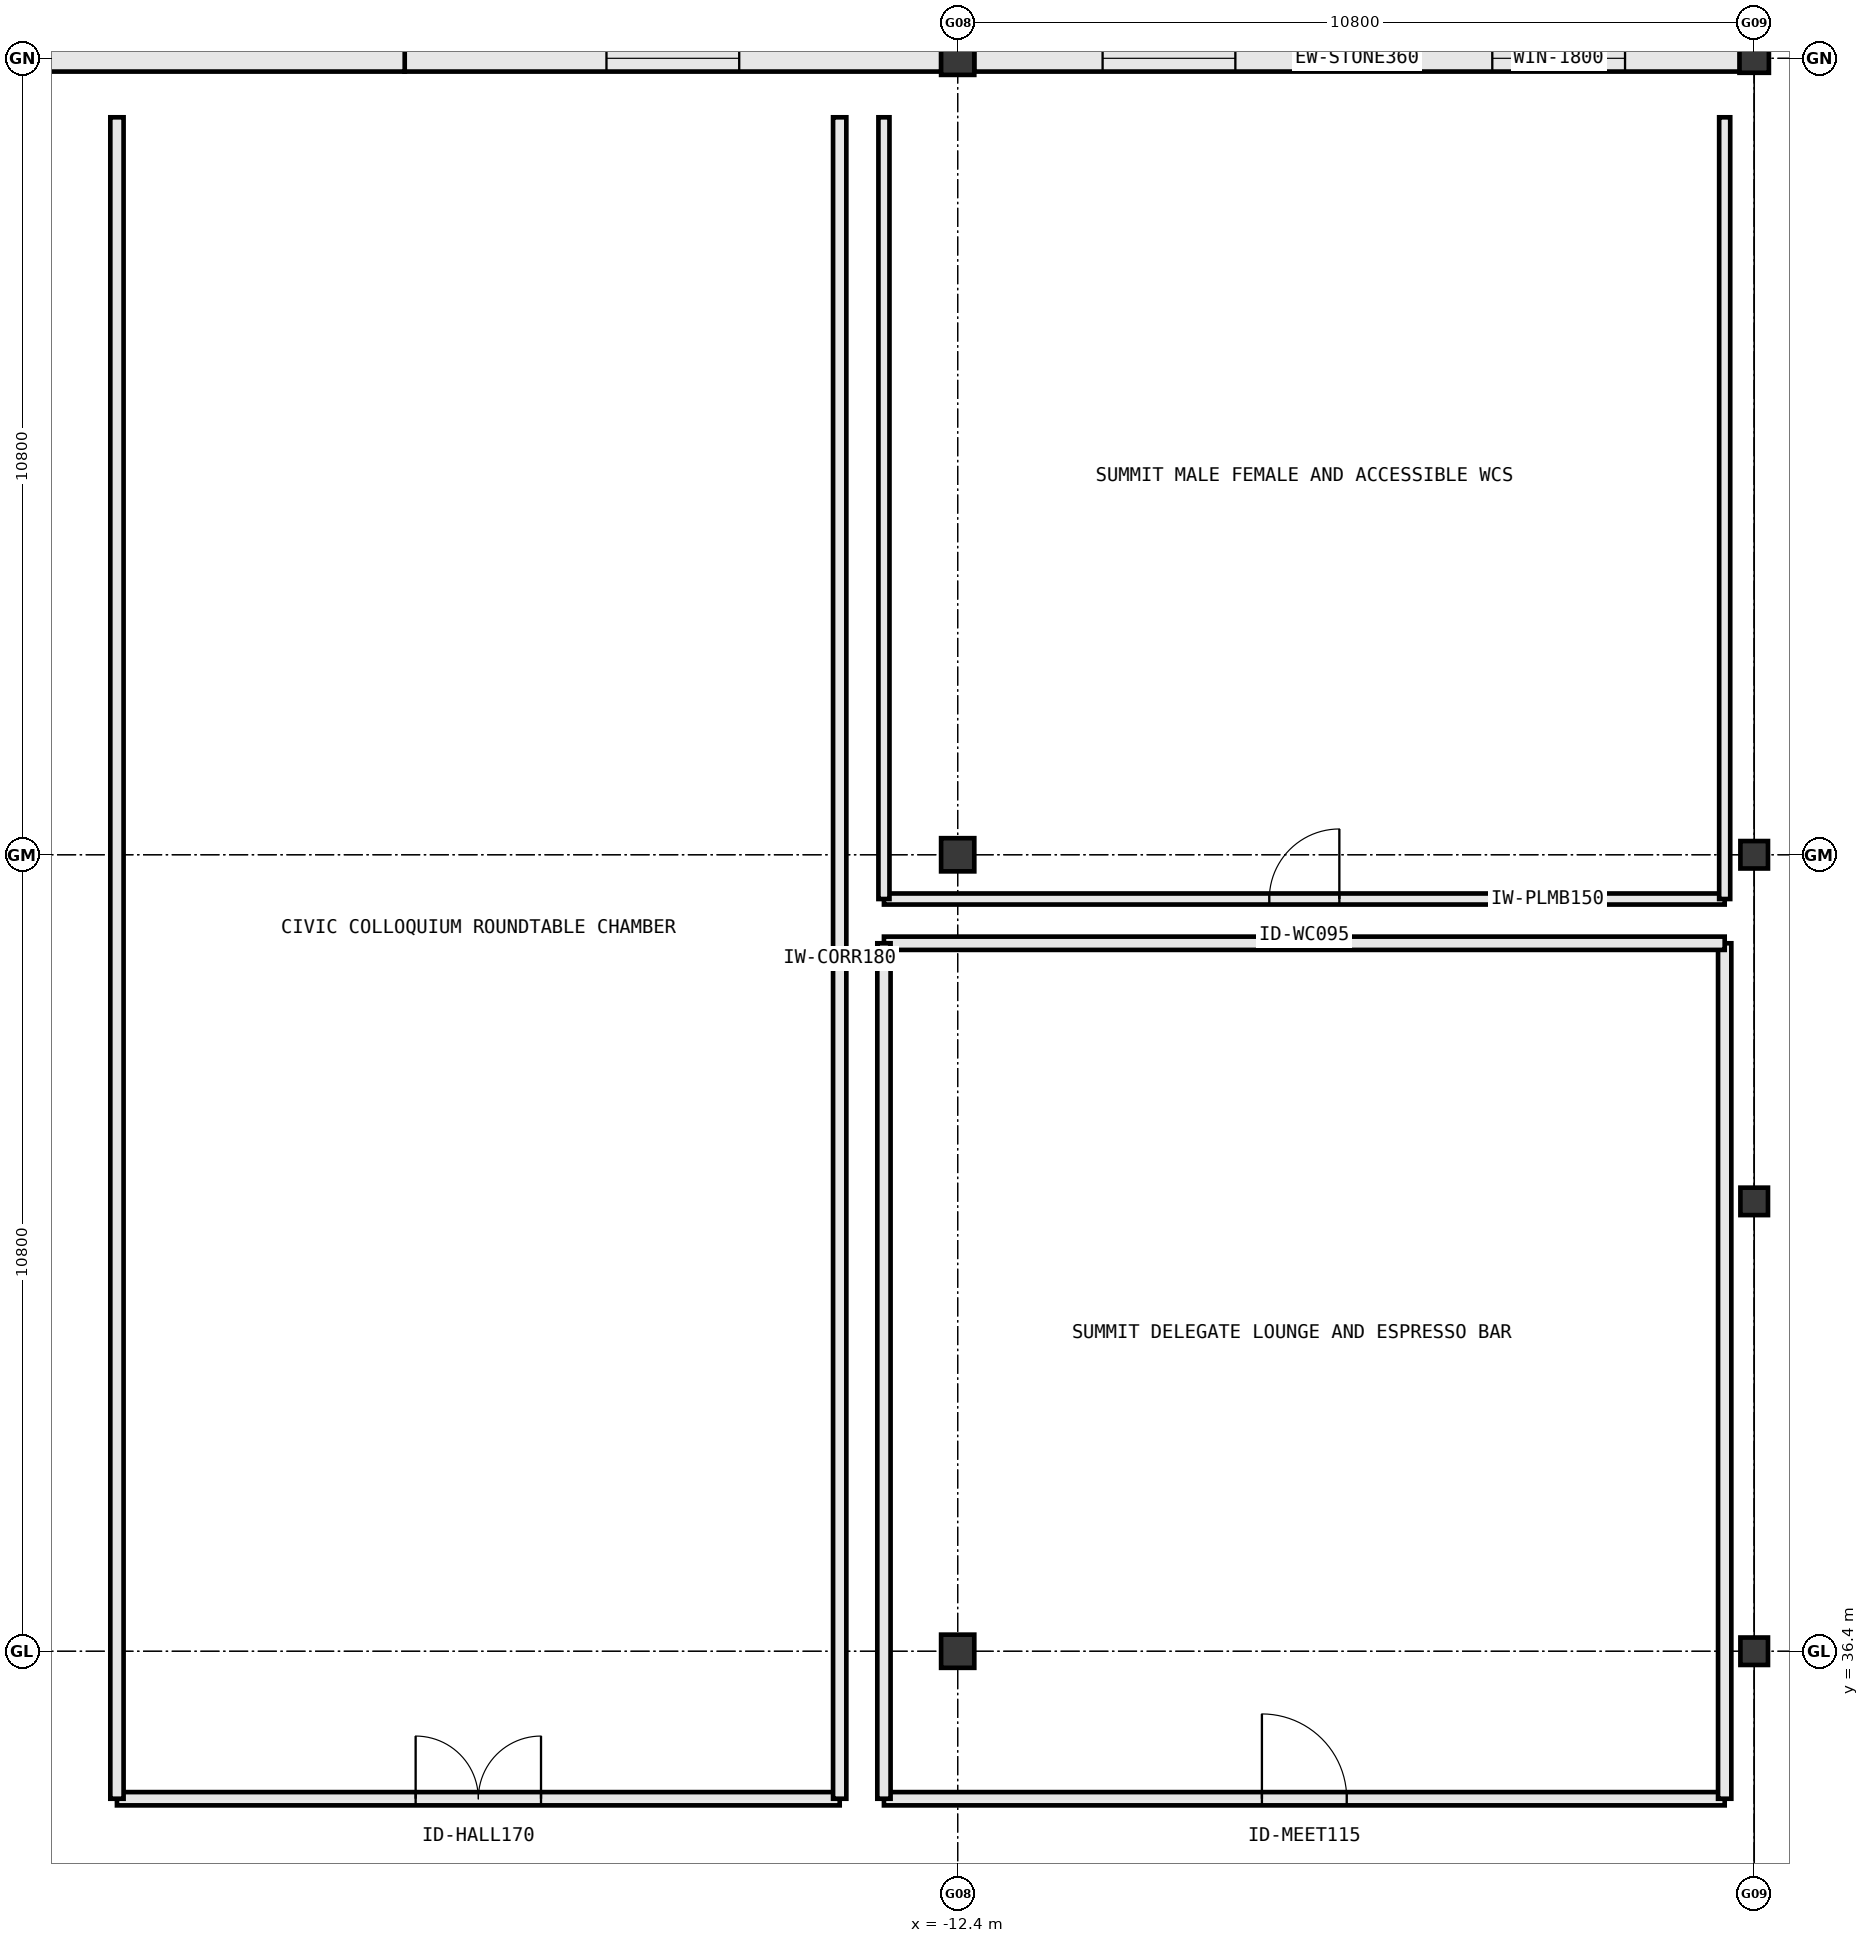
"""IFC4 building model, lengths in metres.
Left out: names, types, materials, properties, quantities, classifications, styles, units other than length and angle.
Written with IfcOpenShell. Run it as: python <this file> out.ifc"""

import sys

from ifc_helpers import new_model, si_unit, direction, frame, frame_2d, origin, origin_2d, place, context, subcontext, project, spatial, rectangle, i_section, extrude, element, fill, save


model = new_model("IFC4")
c1 = context("Model", 3, precision=1e-05, world=origin(), true_north=direction((0.0, 1.0)))
c2 = subcontext(c1, "Body", "Model", "MODEL_VIEW")
j1 = project(units=[si_unit("LENGTHUNIT", "METRE"), si_unit("PLANEANGLEUNIT", "RADIAN")], contexts=[c1])
p1 = place(None, origin())
s1 = spatial("IfcSite", under=j1, at=p1, CompositionType="ELEMENT")
p2 = place(p1, origin())
s2 = spatial("IfcBuilding", under=s1, at=p2, CompositionType="ELEMENT")
p3 = place(p2, frame((0.0, 0.0, 10.8)))
s3 = spatial("IfcBuildingStorey", under=s2, at=p3, CompositionType="ELEMENT", Elevation=10.8)
for number, where, z_axis, x_axis in (
    (1, (-12.4, 36.4, 0.0), (0.0, 0.0, 1.0), (1.0, 0.0, 0.0)),
    (2, (-12.4, 47.2, 0.0), (0.0, 0.0, 1.0), (1.0, 0.0, 0.0)),
    (3, (-12.4, 58.0, 0.0), (0.0, 0.0, 1.0), (1.0, 0.0, 0.0)),
):
    element("IfcColumn", number, at=place(p3, frame(where, z_axis=z_axis, x_axis=x_axis)), inside=s3, PredefinedType="COLUMN", context=c2, shape_type="SweptSolid", body=[
        extrude(rectangle(XDim=0.45, YDim=0.45, at=origin_2d()), origin(), (0.0, 0.0, 1.0), 5.4),
    ])
p4 = place(p3, frame((-1.6, 58.0, 0.0), z_axis=(0.0, 0.0, 1.0), x_axis=(1.0, 0.0, 0.0)))
e4 = element("IfcColumn", 4, at=p4, inside=s3, PredefinedType="COLUMN", context=c2, shape_type="SweptSolid", body=[
    extrude(i_section(OverallWidth=0.399, OverallDepth=0.393, WebThickness=0.023, FlangeThickness=0.037, at=origin_2d()), origin(), (0.0, 0.0, 1.0), 5.4),
])
p5 = place(p3, frame((-1.6, 36.4, 0.0), z_axis=(0.0, 0.0, 1.0), x_axis=(1.0, 0.0, 0.0)))
e5 = element("IfcColumn", 5, at=p5, inside=s3, PredefinedType="COLUMN", context=c2, shape_type="SweptSolid", body=[
    extrude(i_section(OverallWidth=0.374, OverallDepth=0.372, WebThickness=0.016, FlangeThickness=0.026, at=origin_2d()), origin(), (0.0, 0.0, 1.0), 5.4),
])
p6 = place(p3, frame((-1.6, 42.5, 0.0), z_axis=(0.0, 0.0, 1.0), x_axis=(1.0, 0.0, 0.0)))
e6 = element("IfcColumn", 6, at=p6, inside=s3, PredefinedType="COLUMN", context=c2, shape_type="SweptSolid", body=[
    extrude(i_section(OverallWidth=0.374, OverallDepth=0.372, WebThickness=0.016, FlangeThickness=0.026, at=origin_2d()), origin(), (0.0, 0.0, 1.0), 9.75),
])
p7 = place(p3, frame((-1.6, 47.2, 0.0), z_axis=(0.0, 0.0, 1.0), x_axis=(1.0, 0.0, 0.0)))
e7 = element("IfcColumn", 7, at=p7, inside=s3, PredefinedType="COLUMN", context=c2, shape_type="SweptSolid", body=[
    extrude(i_section(OverallWidth=0.374, OverallDepth=0.372, WebThickness=0.016, FlangeThickness=0.026, at=origin_2d()), origin(), (0.0, 0.0, 1.0), 5.4),
])
p8 = place(p3, frame((-1.609, 58.0, 0.0), z_axis=(0.0, 0.0, 1.0), x_axis=(-1.0, 0.0, 0.0)))
e8 = element("IfcWall", 8, at=p8, inside=s3, PredefinedType="STANDARD", context=c2, shape_type="SweptSolid", body=[
    extrude(rectangle(XDim=10.568, YDim=0.36, at=frame_2d((5.284, 0.0))), origin(), (0.0, 0.0, 1.0), 4.016),
])
p9 = place(p8, frame((1.742, 0.0, 0.85)))
e9 = element("IfcOpeningElement", 9, at=p9, cuts=e8, PredefinedType="OPENING", context=c2, shape_type="SweptSolid", body=[
    extrude(rectangle(XDim=1.8, YDim=1.85, at=frame_2d((0.9, 0.925))), frame((0.0, 0.192, 0.0), z_axis=(0.0, -1.0, 0.0), x_axis=(1.0, 0.0, 0.0)), (0.0, 0.0, 1.0), 0.384),
])
p10 = place(p8, frame((7.026, 0.0, 0.85)))
e10 = element("IfcOpeningElement", 10, at=p10, cuts=e8, PredefinedType="OPENING", context=c2, shape_type="SweptSolid", body=[
    extrude(rectangle(XDim=1.8, YDim=1.85, at=frame_2d((0.9, 0.925))), frame((0.0, 0.192, 0.0), z_axis=(0.0, -1.0, 0.0), x_axis=(1.0, 0.0, 0.0)), (0.0, 0.0, 1.0), 0.384),
])
p11 = place(p3, frame((-12.623, 58.0, 0.0), z_axis=(0.0, 0.0, 1.0), x_axis=(-1.0, 0.0, 0.0)))
e11 = element("IfcWall", 11, at=p11, inside=s3, PredefinedType="STANDARD", context=c2, shape_type="SweptSolid", body=[
    extrude(rectangle(XDim=7.279, YDim=0.36, at=frame_2d((3.64, 0.0))), origin(), (0.0, 0.0, 1.0), 4.016),
])
p12 = place(p11, frame((2.74, 0.0, 0.85)))
e12 = element("IfcOpeningElement", 12, at=p12, cuts=e11, PredefinedType="OPENING", context=c2, shape_type="SweptSolid", body=[
    extrude(rectangle(XDim=1.8, YDim=1.85, at=frame_2d((0.9, 0.925))), frame((0.0, 0.192, 0.0), z_axis=(0.0, -1.0, 0.0), x_axis=(1.0, 0.0, 0.0)), (0.0, 0.0, 1.0), 0.384),
])
p13 = place(p3, frame((-19.898, 58.0, 0.0), z_axis=(0.0, 0.0, 1.0), x_axis=(-1.0, 0.0, 0.0)))
e13 = element("IfcWall", 13, at=p13, inside=s3, PredefinedType="STANDARD", context=c2, shape_type="SweptSolid", body=[
    extrude(rectangle(XDim=7.279, YDim=0.36, at=frame_2d((3.64, 0.0))), origin(), (0.0, 0.0, 1.0), 4.016),
])
p14 = place(p3, frame((-23.8, 34.4, 0.0), z_axis=(0.0, 0.0, 1.0), x_axis=(1.0, 0.0, 0.0)))
e14 = element("IfcWall", 14, at=p14, inside=s3, PredefinedType="PARTITIONING", context=c2, shape_type="SweptSolid", body=[
    extrude(rectangle(XDim=9.8, YDim=0.18, at=frame_2d((4.9, 0.0))), origin(), (0.0, 0.0, 1.0), 4.8),
])
p15 = place(p14, frame((4.05, 0.0, 0.0)))
e15 = element("IfcOpeningElement", 15, at=p15, cuts=e14, PredefinedType="OPENING", context=c2, shape_type="SweptSolid", body=[
    extrude(rectangle(XDim=1.7, YDim=2.3, at=frame_2d((0.85, 1.15))), frame((0.0, 0.102, 0.0), z_axis=(0.0, -1.0, 0.0), x_axis=(1.0, 0.0, 0.0)), (0.0, 0.0, 1.0), 0.204),
])
for number, where, z_axis, x_axis in (
    (16, (-14.0, 34.4, 0.0), (0.0, 0.0, 1.0), (0.0, 1.0, 0.0)),
    (17, (-23.8, 57.2, 0.0), (0.0, 0.0, 1.0), (0.0, -1.0, 0.0)),
):
    element("IfcWall", number, at=place(p3, frame(where, z_axis=z_axis, x_axis=x_axis)), inside=s3, PredefinedType="PARTITIONING", context=c2, shape_type="SweptSolid", body=[
        extrude(rectangle(XDim=22.8, YDim=0.18, at=frame_2d((11.4, 0.0))), origin(), (0.0, 0.0, 1.0), 4.8),
    ])
p16 = place(p3, frame((-13.4, 34.4, 0.0), z_axis=(0.0, 0.0, 1.0), x_axis=(1.0, 0.0, 0.0)))
e18 = element("IfcWall", 18, at=p16, inside=s3, PredefinedType="PARTITIONING", context=c2, shape_type="SweptSolid", body=[
    extrude(rectangle(XDim=11.4, YDim=0.18, at=frame_2d((5.7, 0.0))), origin(), (0.0, 0.0, 1.0), 4.8),
])
p17 = place(p16, frame((5.125, 0.0, 0.0)))
e19 = element("IfcOpeningElement", 19, at=p17, cuts=e18, PredefinedType="OPENING", context=c2, shape_type="SweptSolid", body=[
    extrude(rectangle(XDim=1.15, YDim=2.2, at=frame_2d((0.575, 1.1))), frame((0.0, 0.102, 0.0), z_axis=(0.0, -1.0, 0.0), x_axis=(1.0, 0.0, 0.0)), (0.0, 0.0, 1.0), 0.204),
])
p18 = place(p3, frame((-2.0, 34.4, 0.0), z_axis=(0.0, 0.0, 1.0), x_axis=(0.0, 1.0, 0.0)))
e20 = element("IfcWall", 20, at=p18, inside=s3, PredefinedType="PARTITIONING", context=c2, shape_type="SweptSolid", body=[
    extrude(rectangle(XDim=11.6, YDim=0.18, at=frame_2d((5.8, 0.0))), origin(), (0.0, 0.0, 1.0), 4.178),
])
p19 = place(p3, frame((-2.0, 46.0, 0.0), z_axis=(0.0, 0.0, 1.0), x_axis=(-1.0, 0.0, 0.0)))
e21 = element("IfcWall", 21, at=p19, inside=s3, PredefinedType="PARTITIONING", context=c2, shape_type="SweptSolid", body=[
    extrude(rectangle(XDim=11.4, YDim=0.18, at=frame_2d((5.7, 0.0))), origin(), (0.0, 0.0, 1.0), 4.8),
])
p20 = place(p3, frame((-13.4, 46.0, 0.0), z_axis=(0.0, 0.0, 1.0), x_axis=(0.0, -1.0, 0.0)))
e22 = element("IfcWall", 22, at=p20, inside=s3, PredefinedType="PARTITIONING", context=c2, shape_type="SweptSolid", body=[
    extrude(rectangle(XDim=11.6, YDim=0.18, at=frame_2d((5.8, 0.0))), origin(), (0.0, 0.0, 1.0), 4.8),
])
p21 = place(p3, frame((-13.4, 46.6, 0.0), z_axis=(0.0, 0.0, 1.0), x_axis=(1.0, 0.0, 0.0)))
e23 = element("IfcWall", 23, at=p21, inside=s3, PredefinedType="PLUMBINGWALL", context=c2, shape_type="SweptSolid", body=[
    extrude(rectangle(XDim=11.4, YDim=0.15, at=frame_2d((5.7, 0.0))), origin(), (0.0, 0.0, 1.0), 4.8),
])
p22 = place(p21, frame((5.225, 0.0, 0.0)))
e24 = element("IfcOpeningElement", 24, at=p22, cuts=e23, PredefinedType="OPENING", context=c2, shape_type="SweptSolid", body=[
    extrude(rectangle(XDim=0.95, YDim=2.15, at=frame_2d((0.475, 1.075))), frame((0.0, 0.087, 0.0), z_axis=(0.0, -1.0, 0.0), x_axis=(1.0, 0.0, 0.0)), (0.0, 0.0, 1.0), 0.174),
])
p23 = place(p3, frame((-2.0, 46.6, 0.0), z_axis=(0.0, 0.0, 1.0), x_axis=(0.0, 1.0, 0.0)))
e25 = element("IfcWall", 25, at=p23, inside=s3, PredefinedType="PLUMBINGWALL", context=c2, shape_type="SweptSolid", body=[
    extrude(rectangle(XDim=10.6, YDim=0.15, at=frame_2d((5.3, 0.0))), origin(), (0.0, 0.0, 1.0), 4.102),
])
p24 = place(p3, frame((-13.4, 57.2, 0.0), z_axis=(0.0, 0.0, 1.0), x_axis=(0.0, -1.0, 0.0)))
e26 = element("IfcWall", 26, at=p24, inside=s3, PredefinedType="PLUMBINGWALL", context=c2, shape_type="SweptSolid", body=[
    extrude(rectangle(XDim=10.6, YDim=0.15, at=frame_2d((5.3, 0.0))), origin(), (0.0, 0.0, 1.0), 4.8),
])
p25 = place(p9, origin())
e27 = element("IfcWindow", 27, at=p25, inside=s3, PartitioningType="SINGLE_PANEL", PredefinedType="WINDOW", context=c2, shape_type="SweptSolid", body=[
    extrude(rectangle(XDim=1.8, YDim=1.85, at=frame_2d((0.9, 0.925))), frame((0.0, 0.03, 0.0), z_axis=(0.0, -1.0, 0.0), x_axis=(1.0, 0.0, 0.0)), (0.0, 0.0, 1.0), 0.06),
])
fill(e9, e27)
p26 = place(p10, origin())
e28 = element("IfcWindow", 28, at=p26, inside=s3, PartitioningType="SINGLE_PANEL", PredefinedType="WINDOW", context=c2, shape_type="SweptSolid", body=[
    extrude(rectangle(XDim=1.8, YDim=1.85, at=frame_2d((0.9, 0.925))), frame((0.0, 0.03, 0.0), z_axis=(0.0, -1.0, 0.0), x_axis=(1.0, 0.0, 0.0)), (0.0, 0.0, 1.0), 0.06),
])
fill(e10, e28)
p27 = place(p12, origin())
e29 = element("IfcWindow", 29, at=p27, inside=s3, PartitioningType="SINGLE_PANEL", PredefinedType="WINDOW", context=c2, shape_type="SweptSolid", body=[
    extrude(rectangle(XDim=1.8, YDim=1.85, at=frame_2d((0.9, 0.925))), frame((0.0, 0.03, 0.0), z_axis=(0.0, -1.0, 0.0), x_axis=(1.0, 0.0, 0.0)), (0.0, 0.0, 1.0), 0.06),
])
fill(e12, e29)
p28 = place(p15, origin())
e30 = element("IfcDoor", 30, at=p28, inside=s3, OperationType="DOUBLE_DOOR_SINGLE_SWING", PredefinedType="DOOR", context=c2, shape_type="SweptSolid", body=[
    extrude(rectangle(XDim=1.7, YDim=2.3, at=frame_2d((0.85, 1.15))), frame((0.0, 0.025, 0.0), z_axis=(0.0, -1.0, 0.0), x_axis=(1.0, 0.0, 0.0)), (0.0, 0.0, 1.0), 0.05),
])
fill(e15, e30)
p29 = place(p17, origin())
e31 = element("IfcDoor", 31, at=p29, inside=s3, OperationType="SINGLE_SWING_LEFT", PredefinedType="DOOR", context=c2, shape_type="SweptSolid", body=[
    extrude(rectangle(XDim=1.15, YDim=2.2, at=frame_2d((0.575, 1.1))), frame((0.0, 0.025, 0.0), z_axis=(0.0, -1.0, 0.0), x_axis=(1.0, 0.0, 0.0)), (0.0, 0.0, 1.0), 0.05),
])
fill(e19, e31)
p30 = place(p22, origin())
e32 = element("IfcDoor", 32, at=p30, inside=s3, OperationType="SINGLE_SWING_RIGHT", PredefinedType="DOOR", context=c2, shape_type="SweptSolid", body=[
    extrude(rectangle(XDim=0.95, YDim=2.15, at=frame_2d((0.475, 1.075))), frame((0.0, 0.025, 0.0), z_axis=(0.0, -1.0, 0.0), x_axis=(1.0, 0.0, 0.0)), (0.0, 0.0, 1.0), 0.05),
])
fill(e24, e32)
save(model, sys.argv[1])
